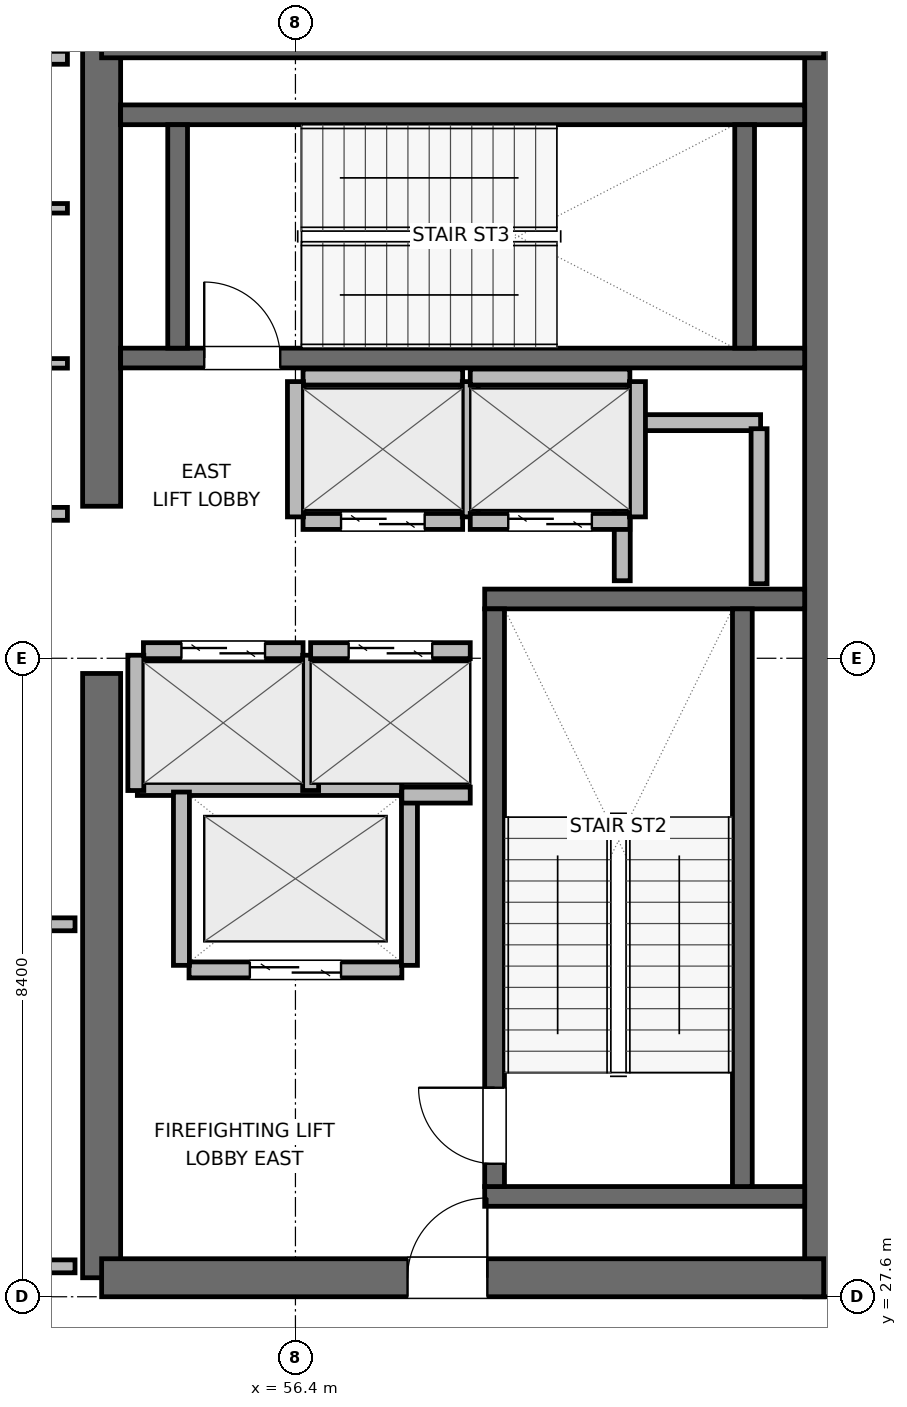
"""IFC4 building model, lengths in metres.
Left out: names, types, materials, properties, quantities, classifications, styles, units other than length and angle.
Written with IfcOpenShell. Run it as: python <this file> out.ifc"""

import sys

from ifc_helpers import new_model, si_unit, direction, frame, frame_2d, origin, place, context, subcontext, project, spatial, rectangle, extrude, element, fill, save


model = new_model("IFC4")
c1 = context("Model", 3, precision=1e-05, world=origin(), true_north=direction((0.0, 1.0)))
c2 = subcontext(c1, "Body", "Model", "MODEL_VIEW")
j1 = project(units=[si_unit("LENGTHUNIT", "METRE"), si_unit("PLANEANGLEUNIT", "RADIAN")], contexts=[c1])
p1 = place(None, origin())
s1 = spatial("IfcSite", under=j1, at=p1, CompositionType="ELEMENT")
p2 = place(p1, origin())
s2 = spatial("IfcBuilding", under=s1, at=p2, CompositionType="ELEMENT")
p3 = place(p2, frame((0.0, 0.0, 342.0)))
s3 = spatial("IfcBuildingStorey", under=s2, at=p3, CompositionType="ELEMENT", Elevation=342.0)
p4 = place(p3, frame((53.85, 27.85, 0.0), z_axis=(0.0, 0.0, 1.0), x_axis=(0.0, 1.0, 0.0)))
e1 = element("IfcWall", 1, at=p4, inside=s3, PredefinedType="SHEAR", context=c2, shape_type="SweptSolid", body=[
    extrude(rectangle(XDim=7.95, YDim=0.5, at=frame_2d((3.975, 0.0))), origin(), (0.0, 0.0, 1.0), 4.5),
])
p5 = place(p3, frame((53.85, 38.0, 0.0), z_axis=(0.0, 0.0, 1.0), x_axis=(0.0, 1.0, 0.0)))
e2 = element("IfcWall", 2, at=p5, inside=s3, PredefinedType="SHEAR", context=c2, shape_type="SweptSolid", body=[
    extrude(rectangle(XDim=6.15, YDim=0.5, at=frame_2d((3.075, 0.0))), origin(), (0.0, 0.0, 1.0), 4.5),
])
p6 = place(p3, frame((63.35, 27.6, 0.0), z_axis=(0.0, 0.0, 1.0), x_axis=(0.0, 1.0, 0.0)))
e3 = element("IfcWall", 3, at=p6, inside=s3, PredefinedType="SHEAR", context=c2, shape_type="SweptSolid", body=[
    extrude(rectangle(XDim=16.8, YDim=0.5, at=frame_2d((8.4, 0.0))), origin(), (0.0, 0.0, 1.0), 4.5),
])
p7 = place(p3, frame((53.85, 27.85, 0.0), z_axis=(0.0, 0.0, 1.0), x_axis=(1.0, 0.0, 0.0)))
e4 = element("IfcWall", 4, at=p7, inside=s3, PredefinedType="SHEAR", context=c2, shape_type="SweptSolid", body=[
    extrude(rectangle(XDim=9.5, YDim=0.5, at=frame_2d((4.75, 0.0))), origin(), (0.0, 0.0, 1.0), 4.5),
])
p8 = place(p7, frame((4.025, 0.0, 0.0)))
e5 = element("IfcOpeningElement", 5, at=p8, cuts=e4, PredefinedType="OPENING", context=c2, shape_type="SweptSolid", body=[
    extrude(rectangle(XDim=1.05, YDim=2.04, at=frame_2d((0.525, 1.02))), frame((0.0, 0.26, 0.0), z_axis=(0.0, -1.0, 0.0), x_axis=(1.0, 0.0, 0.0)), (0.0, 0.0, 1.0), 0.52),
])
p9 = place(p3, frame((53.85, 44.15, 0.0), z_axis=(0.0, 0.0, 1.0), x_axis=(1.0, 0.0, 0.0)))
e6 = element("IfcWall", 6, at=p9, inside=s3, PredefinedType="SHEAR", context=c2, shape_type="SweptSolid", body=[
    extrude(rectangle(XDim=9.5, YDim=0.5, at=frame_2d((4.75, 0.0))), origin(), (0.0, 0.0, 1.0), 4.5),
])
for number, where, z_axis, x_axis in (
    (7, (58.89, 28.92, 0.0), (0.0, 0.0, 1.0), (1.0, 0.0, 0.0)),
    (8, (58.89, 36.78, 0.0), (0.0, 0.0, 1.0), (1.0, 0.0, 0.0)),
):
    element("IfcWall", number, at=place(p3, frame(where, z_axis=z_axis, x_axis=x_axis)), inside=s3, PredefinedType="SHEAR", context=c2, shape_type="SweptSolid", body=[
        extrude(rectangle(XDim=4.21, YDim=0.26, at=frame_2d((2.105, 0.0))), origin(), (0.0, 0.0, 1.0), 4.5),
    ])
p10 = place(p3, frame((59.02, 29.05, 0.0), z_axis=(0.0, 0.0, 1.0), x_axis=(0.0, 1.0, 0.0)))
e9 = element("IfcWall", 9, at=p10, inside=s3, PredefinedType="SHEAR", context=c2, shape_type="SweptSolid", body=[
    extrude(rectangle(XDim=7.6, YDim=0.26, at=frame_2d((3.8, 0.0))), origin(), (0.0, 0.0, 1.0), 4.5),
])
p11 = place(p10, frame((0.3, 0.0, 0.0)))
e10 = element("IfcOpeningElement", 10, at=p11, cuts=e9, PredefinedType="OPENING", context=c2, shape_type="SweptSolid", body=[
    extrude(rectangle(XDim=1.0, YDim=2.04, at=frame_2d((0.5, 1.02))), frame((0.0, 0.14, 0.0), z_axis=(0.0, -1.0, 0.0), x_axis=(1.0, 0.0, 0.0)), (0.0, 0.0, 1.0), 0.28),
])
p12 = place(p3, frame((62.28, 29.05, 0.0), z_axis=(0.0, 0.0, 1.0), x_axis=(0.0, 1.0, 0.0)))
e11 = element("IfcWall", 11, at=p12, inside=s3, PredefinedType="SHEAR", context=c2, shape_type="SweptSolid", body=[
    extrude(rectangle(XDim=7.6, YDim=0.26, at=frame_2d((3.8, 0.0))), origin(), (0.0, 0.0, 1.0), 4.5),
])
p13 = place(p3, frame((54.1, 39.95, 0.0), z_axis=(0.0, 0.0, 1.0), x_axis=(1.0, 0.0, 0.0)))
e12 = element("IfcWall", 12, at=p13, inside=s3, PredefinedType="SHEAR", context=c2, shape_type="SweptSolid", body=[
    extrude(rectangle(XDim=9.0, YDim=0.26, at=frame_2d((4.5, 0.0))), origin(), (0.0, 0.0, 1.0), 4.5),
])
p14 = place(p13, frame((1.1, 0.0, 0.0)))
e13 = element("IfcOpeningElement", 13, at=p14, cuts=e12, PredefinedType="OPENING", context=c2, shape_type="SweptSolid", body=[
    extrude(rectangle(XDim=1.0, YDim=2.04, at=frame_2d((0.5, 1.02))), frame((0.0, 0.14, 0.0), z_axis=(0.0, -1.0, 0.0), x_axis=(1.0, 0.0, 0.0)), (0.0, 0.0, 1.0), 0.28),
])
p15 = place(p3, frame((54.1, 43.15, 0.0), z_axis=(0.0, 0.0, 1.0), x_axis=(1.0, 0.0, 0.0)))
e14 = element("IfcWall", 14, at=p15, inside=s3, PredefinedType="SHEAR", context=c2, shape_type="SweptSolid", body=[
    extrude(rectangle(XDim=9.0, YDim=0.26, at=frame_2d((4.5, 0.0))), origin(), (0.0, 0.0, 1.0), 4.5),
])
for number, where, z_axis, x_axis in (
    (15, (54.85, 40.08, 0.0), (0.0, 0.0, 1.0), (0.0, 1.0, 0.0)),
    (16, (62.31, 40.08, 0.0), (0.0, 0.0, 1.0), (0.0, 1.0, 0.0)),
):
    element("IfcWall", number, at=place(p3, frame(where, z_axis=z_axis, x_axis=x_axis)), inside=s3, PredefinedType="SHEAR", context=c2, shape_type="SweptSolid", body=[
        extrude(rectangle(XDim=2.94, YDim=0.26, at=frame_2d((1.47, 0.0))), origin(), (0.0, 0.0, 1.0), 4.5),
    ])
p16 = place(p3, frame((60.72, 39.1, 0.0), z_axis=(0.0, 0.0, 1.0), x_axis=(1.0, 0.0, 0.0)))
e17 = element("IfcWall", 17, at=p16, inside=s3, PredefinedType="PARTITIONING", context=c2, shape_type="SweptSolid", body=[
    extrude(rectangle(XDim=1.8, YDim=0.21, at=frame_2d((0.9, 0.0))), origin(), (0.0, 0.0, 1.0), 4.28),
])
p17 = place(p3, frame((60.7, 37.02, 0.0), z_axis=(0.0, 0.0, 1.0), x_axis=(0.0, 1.0, 0.0)))
e18 = element("IfcWall", 18, at=p17, inside=s3, PredefinedType="PARTITIONING", context=c2, shape_type="SweptSolid", body=[
    extrude(rectangle(XDim=1.96, YDim=0.21, at=frame_2d((0.98, 0.0))), origin(), (0.0, 0.0, 1.0), 4.28),
])
p18 = place(p3, frame((62.5, 36.98, 0.0), z_axis=(0.0, 0.0, 1.0), x_axis=(0.0, 1.0, 0.0)))
e19 = element("IfcWall", 19, at=p18, inside=s3, PredefinedType="PARTITIONING", context=c2, shape_type="SweptSolid", body=[
    extrude(rectangle(XDim=2.04, YDim=0.21, at=frame_2d((1.02, 0.0))), origin(), (0.0, 0.0, 1.0), 4.28),
])
p19 = place(p3, frame((55.0, 31.9, 0.0), z_axis=(0.0, 0.0, 1.0), x_axis=(1.0, 0.0, 0.0)))
e20 = element("IfcWall", 20, at=p19, inside=s3, PredefinedType="PARTITIONING", context=c2, shape_type="SweptSolid", body=[
    extrude(rectangle(XDim=2.8, YDim=0.21, at=frame_2d((1.4, 0.0))), origin(), (0.0, 0.0, 1.0), 4.28),
])
p20 = place(p19, frame((0.8, 0.0, 0.0)))
e21 = element("IfcOpeningElement", 21, at=p20, cuts=e20, PredefinedType="OPENING", context=c2, shape_type="SweptSolid", body=[
    extrude(rectangle(XDim=1.2, YDim=2.04, at=frame_2d((0.6, 1.02))), frame((0.0, 0.115, 0.0), z_axis=(0.0, -1.0, 0.0), x_axis=(1.0, 0.0, 0.0)), (0.0, 0.0, 1.0), 0.23),
])
p21 = place(p3, frame((54.32, 34.3, 0.0), z_axis=(0.0, 0.0, 1.0), x_axis=(1.0, 0.0, 0.0)))
e22 = element("IfcWall", 22, at=p21, inside=s3, PredefinedType="PARTITIONING", context=c2, shape_type="SweptSolid", body=[
    extrude(rectangle(XDim=3.48, YDim=0.21, at=frame_2d((1.74, 0.0))), origin(), (0.0, 0.0, 1.0), 4.28),
])
for number, where, z_axis, x_axis in (
    (23, (54.9, 31.96, 0.0), (0.0, 0.0, 1.0), (0.0, 1.0, 0.0)),
    (24, (57.9, 31.96, 0.0), (0.0, 0.0, 1.0), (0.0, 1.0, 0.0)),
):
    element("IfcWall", number, at=place(p3, frame(where, z_axis=z_axis, x_axis=x_axis)), inside=s3, PredefinedType="PARTITIONING", context=c2, shape_type="SweptSolid", body=[
        extrude(rectangle(XDim=2.28, YDim=0.21, at=frame_2d((1.14, 0.0))), origin(), (0.0, 0.0, 1.0), 4.28),
    ])
p22 = place(p3, frame((54.4, 36.1, 0.0), z_axis=(0.0, 0.0, 1.0), x_axis=(1.0, 0.0, 0.0)))
e25 = element("IfcWall", 25, at=p22, inside=s3, PredefinedType="PARTITIONING", context=c2, shape_type="SweptSolid", body=[
    extrude(rectangle(XDim=2.1, YDim=0.21, at=frame_2d((1.05, 0.0))), origin(), (0.0, 0.0, 1.0), 4.28),
])
p23 = place(p22, frame((0.5, 0.0, 0.0)))
e26 = element("IfcOpeningElement", 26, at=p23, cuts=e25, PredefinedType="OPENING", context=c2, shape_type="SweptSolid", body=[
    extrude(rectangle(XDim=1.1, YDim=2.04, at=frame_2d((0.55, 1.02))), frame((0.0, 0.115, 0.0), z_axis=(0.0, -1.0, 0.0), x_axis=(1.0, 0.0, 0.0)), (0.0, 0.0, 1.0), 0.23),
])
for number, where, z_axis, x_axis in (
    (27, (54.3, 34.26, 0.0), (0.0, 0.0, 1.0), (0.0, 1.0, 0.0)),
    (28, (56.6, 34.26, 0.0), (0.0, 0.0, 1.0), (0.0, 1.0, 0.0)),
):
    element("IfcWall", number, at=place(p3, frame(where, z_axis=z_axis, x_axis=x_axis)), inside=s3, PredefinedType="PARTITIONING", context=c2, shape_type="SweptSolid", body=[
        extrude(rectangle(XDim=1.78, YDim=0.21, at=frame_2d((0.89, 0.0))), origin(), (0.0, 0.0, 1.0), 4.28),
    ])
p24 = place(p3, frame((56.6, 36.1, 0.0), z_axis=(0.0, 0.0, 1.0), x_axis=(1.0, 0.0, 0.0)))
e29 = element("IfcWall", 29, at=p24, inside=s3, PredefinedType="PARTITIONING", context=c2, shape_type="SweptSolid", body=[
    extrude(rectangle(XDim=2.1, YDim=0.21, at=frame_2d((1.05, 0.0))), origin(), (0.0, 0.0, 1.0), 4.28),
])
p25 = place(p24, frame((0.5, 0.0, 0.0)))
e30 = element("IfcOpeningElement", 30, at=p25, cuts=e29, PredefinedType="OPENING", context=c2, shape_type="SweptSolid", body=[
    extrude(rectangle(XDim=1.1, YDim=2.04, at=frame_2d((0.55, 1.02))), frame((0.0, 0.115, 0.0), z_axis=(0.0, -1.0, 0.0), x_axis=(1.0, 0.0, 0.0)), (0.0, 0.0, 1.0), 0.23),
])
p26 = place(p3, frame((57.8, 34.2, 0.0), z_axis=(0.0, 0.0, 1.0), x_axis=(1.0, 0.0, 0.0)))
e31 = element("IfcWall", 31, at=p26, inside=s3, PredefinedType="PARTITIONING", context=c2, shape_type="SweptSolid", body=[
    extrude(rectangle(XDim=0.9, YDim=0.21, at=frame_2d((0.45, 0.0))), origin(), (0.0, 0.0, 1.0), 4.28),
])
p27 = place(p3, frame((56.5, 37.8, 0.0), z_axis=(0.0, 0.0, 1.0), x_axis=(1.0, 0.0, 0.0)))
e32 = element("IfcWall", 32, at=p27, inside=s3, PredefinedType="PARTITIONING", context=c2, shape_type="SweptSolid", body=[
    extrude(rectangle(XDim=2.1, YDim=0.21, at=frame_2d((1.05, 0.0))), origin(), (0.0, 0.0, 1.0), 4.28),
])
p28 = place(p27, frame((0.5, 0.0, 0.0)))
e33 = element("IfcOpeningElement", 33, at=p28, cuts=e32, PredefinedType="OPENING", context=c2, shape_type="SweptSolid", body=[
    extrude(rectangle(XDim=1.1, YDim=2.04, at=frame_2d((0.55, 1.02))), frame((0.0, 0.115, 0.0), z_axis=(0.0, -1.0, 0.0), x_axis=(1.0, 0.0, 0.0)), (0.0, 0.0, 1.0), 0.23),
])
p29 = place(p3, frame((56.5, 39.7, 0.0), z_axis=(0.0, 0.0, 1.0), x_axis=(1.0, 0.0, 0.0)))
e34 = element("IfcWall", 34, at=p29, inside=s3, PredefinedType="PARTITIONING", context=c2, shape_type="SweptSolid", body=[
    extrude(rectangle(XDim=2.1, YDim=0.21, at=frame_2d((1.05, 0.0))), origin(), (0.0, 0.0, 1.0), 4.28),
])
for number, where, z_axis, x_axis in (
    (35, (56.4, 37.86, 0.0), (0.0, 0.0, 1.0), (0.0, 1.0, 0.0)),
    (36, (58.7, 37.86, 0.0), (0.0, 0.0, 1.0), (0.0, 1.0, 0.0)),
):
    element("IfcWall", number, at=place(p3, frame(where, z_axis=z_axis, x_axis=x_axis)), inside=s3, PredefinedType="PARTITIONING", context=c2, shape_type="SweptSolid", body=[
        extrude(rectangle(XDim=1.78, YDim=0.21, at=frame_2d((0.89, 0.0))), origin(), (0.0, 0.0, 1.0), 4.28),
    ])
p30 = place(p3, frame((58.7, 37.8, 0.0), z_axis=(0.0, 0.0, 1.0), x_axis=(1.0, 0.0, 0.0)))
e37 = element("IfcWall", 37, at=p30, inside=s3, PredefinedType="PARTITIONING", context=c2, shape_type="SweptSolid", body=[
    extrude(rectangle(XDim=2.1, YDim=0.21, at=frame_2d((1.05, 0.0))), origin(), (0.0, 0.0, 1.0), 4.28),
])
p31 = place(p30, frame((0.5, 0.0, 0.0)))
e38 = element("IfcOpeningElement", 38, at=p31, cuts=e37, PredefinedType="OPENING", context=c2, shape_type="SweptSolid", body=[
    extrude(rectangle(XDim=1.1, YDim=2.04, at=frame_2d((0.55, 1.02))), frame((0.0, 0.115, 0.0), z_axis=(0.0, -1.0, 0.0), x_axis=(1.0, 0.0, 0.0)), (0.0, 0.0, 1.0), 0.23),
])
p32 = place(p3, frame((58.7, 39.7, 0.0), z_axis=(0.0, 0.0, 1.0), x_axis=(1.0, 0.0, 0.0)))
e39 = element("IfcWall", 39, at=p32, inside=s3, PredefinedType="PARTITIONING", context=c2, shape_type="SweptSolid", body=[
    extrude(rectangle(XDim=2.1, YDim=0.21, at=frame_2d((1.05, 0.0))), origin(), (0.0, 0.0, 1.0), 4.28),
])
p33 = place(p3, frame((60.9, 37.86, 0.0), z_axis=(0.0, 0.0, 1.0), x_axis=(0.0, 1.0, 0.0)))
e40 = element("IfcWall", 40, at=p33, inside=s3, PredefinedType="PARTITIONING", context=c2, shape_type="SweptSolid", body=[
    extrude(rectangle(XDim=1.78, YDim=0.21, at=frame_2d((0.89, 0.0))), origin(), (0.0, 0.0, 1.0), 4.28),
])
p34 = place(p3, frame((49.287, 28.0, 0.0), z_axis=(0.0, 0.0, 1.0), x_axis=(1.0, 0.0, 0.0)))
e41 = element("IfcWall", 41, at=p34, inside=s3, PredefinedType="PARTITIONING", context=c2, shape_type="SweptSolid", body=[
    extrude(rectangle(XDim=4.213, YDim=0.17, at=frame_2d((2.106, 0.0))), origin(), (0.0, 0.0, 1.0), 3.365),
])
p35 = place(p3, frame((52.2, 32.5, 0.0), z_axis=(0.0, 0.0, 1.0), x_axis=(1.0, 0.0, 0.0)))
e42 = element("IfcWall", 42, at=p35, inside=s3, PredefinedType="PARTITIONING", context=c2, shape_type="SweptSolid", body=[
    extrude(rectangle(XDim=1.3, YDim=0.17, at=frame_2d((0.65, 0.0))), origin(), (0.0, 0.0, 1.0), 4.28),
])
p36 = place(p3, frame((49.287, 37.9, 0.0), z_axis=(0.0, 0.0, 1.0), x_axis=(1.0, 0.0, 0.0)))
e43 = element("IfcWall", 43, at=p36, inside=s3, PredefinedType="PARTITIONING", context=c2, shape_type="SweptSolid", body=[
    extrude(rectangle(XDim=4.113, YDim=0.17, at=frame_2d((2.056, 0.0))), origin(), (0.0, 0.0, 1.0), 4.28),
])
p37 = place(p3, frame((49.287, 43.9, 0.0), z_axis=(0.0, 0.0, 1.0), x_axis=(1.0, 0.0, 0.0)))
e44 = element("IfcWall", 44, at=p37, inside=s3, PredefinedType="PARTITIONING", context=c2, shape_type="SweptSolid", body=[
    extrude(rectangle(XDim=4.113, YDim=0.17, at=frame_2d((2.056, 0.0))), origin(), (0.0, 0.0, 1.0), 3.365),
])
for number, where, z_axis, x_axis in (
    (45, (49.287, 39.88, 0.0), (0.0, 0.0, 1.0), (1.0, 0.0, 0.0)),
    (46, (49.287, 41.92, 0.0), (0.0, 0.0, 1.0), (1.0, 0.0, 0.0)),
):
    element("IfcWall", number, at=place(p3, frame(where, z_axis=z_axis, x_axis=x_axis)), inside=s3, PredefinedType="PARTITIONING", context=c2, shape_type="SweptSolid", body=[
        extrude(rectangle(XDim=4.113, YDim=0.125, at=frame_2d((2.056, 0.0))), origin(), (0.0, 0.0, 1.0), 4.28),
    ])
p38 = place(p11, origin())
e47 = element("IfcDoor", 47, at=p38, inside=s3, OperationType="SINGLE_SWING_RIGHT", PredefinedType="DOOR", context=c2, shape_type="SweptSolid", body=[
    extrude(rectangle(XDim=1.0, YDim=2.04, at=frame_2d((0.5, 1.02))), frame((0.0, 0.025, 0.0), z_axis=(0.0, -1.0, 0.0), x_axis=(1.0, 0.0, 0.0)), (0.0, 0.0, 1.0), 0.05),
])
fill(e10, e47)
p39 = place(p14, origin())
e48 = element("IfcDoor", 48, at=p39, inside=s3, OperationType="SINGLE_SWING_LEFT", PredefinedType="DOOR", context=c2, shape_type="SweptSolid", body=[
    extrude(rectangle(XDim=1.0, YDim=2.04, at=frame_2d((0.5, 1.02))), frame((0.0, 0.025, 0.0), z_axis=(0.0, -1.0, 0.0), x_axis=(1.0, 0.0, 0.0)), (0.0, 0.0, 1.0), 0.05),
])
fill(e13, e48)
p40 = place(p20, origin())
e49 = element("IfcDoor", 49, at=p40, inside=s3, OperationType="DOUBLE_DOOR_SLIDING", PredefinedType="DOOR", context=c2, shape_type="SweptSolid", body=[
    extrude(rectangle(XDim=1.2, YDim=2.04, at=frame_2d((0.6, 1.02))), frame((0.0, 0.025, 0.0), z_axis=(0.0, -1.0, 0.0), x_axis=(1.0, 0.0, 0.0)), (0.0, 0.0, 1.0), 0.05),
])
fill(e21, e49)
p41 = place(p23, origin())
e50 = element("IfcDoor", 50, at=p41, inside=s3, OperationType="DOUBLE_DOOR_SLIDING", PredefinedType="DOOR", context=c2, shape_type="SweptSolid", body=[
    extrude(rectangle(XDim=1.1, YDim=2.04, at=frame_2d((0.55, 1.02))), frame((0.0, 0.025, 0.0), z_axis=(0.0, -1.0, 0.0), x_axis=(1.0, 0.0, 0.0)), (0.0, 0.0, 1.0), 0.05),
])
fill(e26, e50)
p42 = place(p25, origin())
e51 = element("IfcDoor", 51, at=p42, inside=s3, OperationType="DOUBLE_DOOR_SLIDING", PredefinedType="DOOR", context=c2, shape_type="SweptSolid", body=[
    extrude(rectangle(XDim=1.1, YDim=2.04, at=frame_2d((0.55, 1.02))), frame((0.0, 0.025, 0.0), z_axis=(0.0, -1.0, 0.0), x_axis=(1.0, 0.0, 0.0)), (0.0, 0.0, 1.0), 0.05),
])
fill(e30, e51)
p43 = place(p28, origin())
e52 = element("IfcDoor", 52, at=p43, inside=s3, OperationType="DOUBLE_DOOR_SLIDING", PredefinedType="DOOR", context=c2, shape_type="SweptSolid", body=[
    extrude(rectangle(XDim=1.1, YDim=2.04, at=frame_2d((0.55, 1.02))), frame((0.0, 0.025, 0.0), z_axis=(0.0, -1.0, 0.0), x_axis=(1.0, 0.0, 0.0)), (0.0, 0.0, 1.0), 0.05),
])
fill(e33, e52)
p44 = place(p31, origin())
e53 = element("IfcDoor", 53, at=p44, inside=s3, OperationType="DOUBLE_DOOR_SLIDING", PredefinedType="DOOR", context=c2, shape_type="SweptSolid", body=[
    extrude(rectangle(XDim=1.1, YDim=2.04, at=frame_2d((0.55, 1.02))), frame((0.0, 0.025, 0.0), z_axis=(0.0, -1.0, 0.0), x_axis=(1.0, 0.0, 0.0)), (0.0, 0.0, 1.0), 0.05),
])
fill(e38, e53)
p45 = place(p8, origin())
e54 = element("IfcDoor", 54, at=p45, inside=s3, OperationType="SINGLE_SWING_RIGHT", PredefinedType="DOOR", context=c2, shape_type="SweptSolid", body=[
    extrude(rectangle(XDim=1.05, YDim=2.04, at=frame_2d((0.525, 1.02))), frame((0.0, 0.025, 0.0), z_axis=(0.0, -1.0, 0.0), x_axis=(1.0, 0.0, 0.0)), (0.0, 0.0, 1.0), 0.05),
])
fill(e5, e54)
save(model, sys.argv[1])
